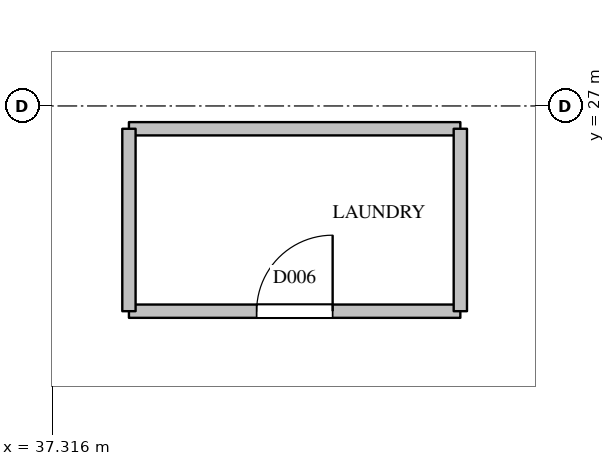
"""IFC4 building model, lengths in metres.
Left out: names, types, materials, properties, quantities, classifications, styles, units other than length and angle.
Written with IfcOpenShell. Run it as: python <this file> out.ifc"""

import sys

from ifc_helpers import new_model, si_unit, direction, frame, frame_2d, origin, place, context, subcontext, project, spatial, rectangle, extrude, element, fill, save


model = new_model("IFC4")
c1 = context("Model", 3, precision=1e-05, world=origin(), true_north=direction((0.0, 1.0)))
c2 = subcontext(c1, "Body", "Model", "MODEL_VIEW")
j1 = project(units=[si_unit("LENGTHUNIT", "METRE"), si_unit("PLANEANGLEUNIT", "RADIAN")], contexts=[c1])
p1 = place(None, origin())
s1 = spatial("IfcSite", under=j1, at=p1, CompositionType="ELEMENT")
p2 = place(p1, origin())
s2 = spatial("IfcBuilding", under=s1, at=p2, CompositionType="ELEMENT")
p3 = place(p2, frame((0.0, 0.0, 115.8)))
s3 = spatial("IfcBuildingStorey", under=s2, at=p3, CompositionType="ELEMENT", Elevation=115.8)
p4 = place(p3, frame((38.32, 24.3, 0.0), z_axis=(0.0, 0.0, 1.0), x_axis=(1.0, 0.0, 0.0)))
e1 = element("IfcWall", 1, at=p4, inside=s3, PredefinedType="PARTITIONING", context=c2, shape_type="SweptSolid", body=[
    extrude(rectangle(XDim=4.36, YDim=0.175, at=frame_2d((2.18, 0.0))), origin(), (0.0, 0.0, 1.0), 3.5),
])
p5 = place(p4, frame((1.68, 0.0, 0.0)))
e2 = element("IfcOpeningElement", 2, at=p5, cuts=e1, PredefinedType="OPENING", context=c2, shape_type="SweptSolid", body=[
    extrude(rectangle(XDim=1.0, YDim=2.1, at=frame_2d((0.5, 1.05))), frame((0.0, 0.097, 0.0), z_axis=(0.0, -1.0, 0.0), x_axis=(1.0, 0.0, 0.0)), (0.0, 0.0, 1.0), 0.195),
])
p6 = place(p3, frame((38.32, 26.7, 0.0), z_axis=(0.0, 0.0, 1.0), x_axis=(1.0, 0.0, 0.0)))
e3 = element("IfcWall", 3, at=p6, inside=s3, PredefinedType="PARTITIONING", context=c2, shape_type="SweptSolid", body=[
    extrude(rectangle(XDim=4.36, YDim=0.175, at=frame_2d((2.18, 0.0))), origin(), (0.0, 0.0, 1.0), 2.5),
])
for number, where, z_axis, x_axis in (
    (4, (38.32, 24.3, 0.0), (0.0, 0.0, 1.0), (0.0, 1.0, 0.0)),
    (5, (42.68, 24.3, 0.0), (0.0, 0.0, 1.0), (0.0, 1.0, 0.0)),
):
    element("IfcWall", number, at=place(p3, frame(where, z_axis=z_axis, x_axis=x_axis)), inside=s3, PredefinedType="PARTITIONING", context=c2, shape_type="SweptSolid", body=[
        extrude(rectangle(XDim=2.4, YDim=0.175, at=frame_2d((1.2, 0.0))), origin(), (0.0, 0.0, 1.0), 2.5),
    ])
p7 = place(p5, origin())
e6 = element("IfcDoor", 6, at=p7, inside=s3, OperationType="SINGLE_SWING_RIGHT", PredefinedType="DOOR", context=c2, shape_type="SweptSolid", body=[
    extrude(rectangle(XDim=1.0, YDim=2.1, at=frame_2d((0.5, 1.05))), frame((0.0, 0.025, 0.0), z_axis=(0.0, -1.0, 0.0), x_axis=(1.0, 0.0, 0.0)), (0.0, 0.0, 1.0), 0.05),
])
fill(e2, e6)
save(model, sys.argv[1])
